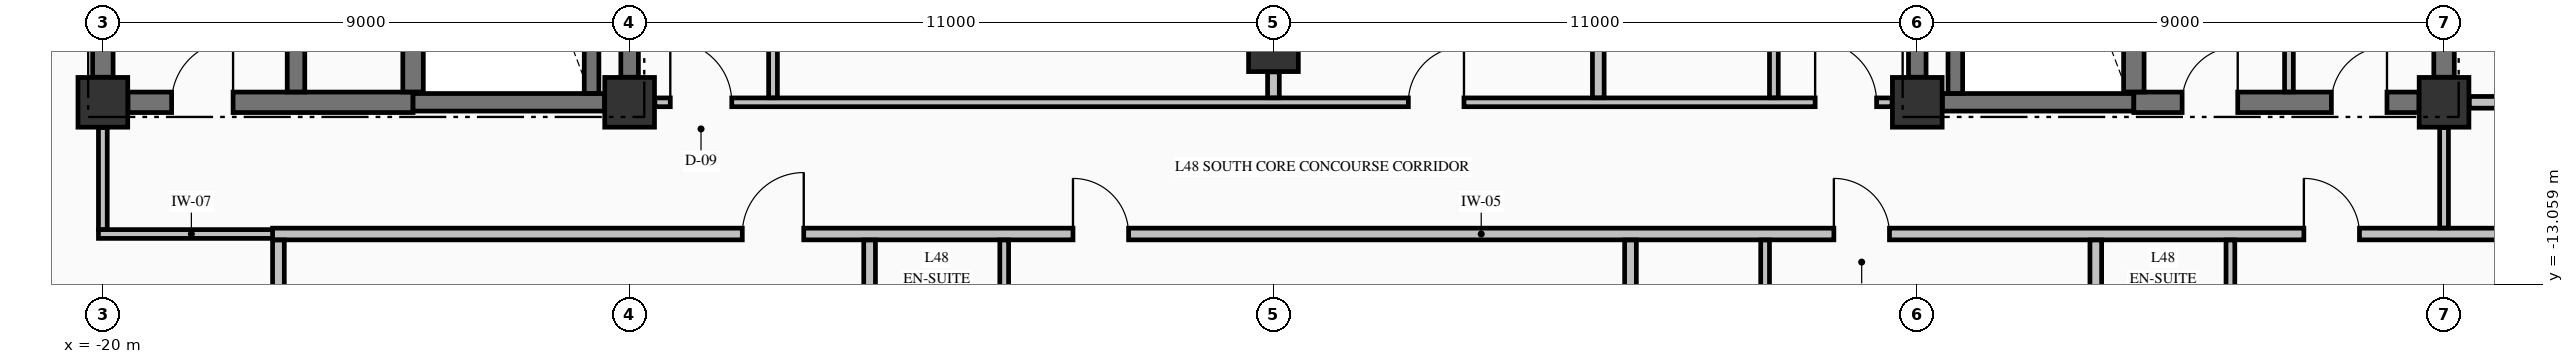
"""IFC4 building model, lengths in metres.
Left out: names, types, materials, properties, quantities, classifications, styles, units other than length and angle.
Written with IfcOpenShell. Run it as: python <this file> out.ifc"""

import sys

from ifc_helpers import new_model, si_unit, direction, frame, frame_2d, origin, origin_2d, place, context, subcontext, project, spatial, rectangle, extrude, element, fill, save


model = new_model("IFC4")
c1 = context("Model", 3, precision=1e-05, world=origin(), true_north=direction((0.0, 1.0)))
c2 = subcontext(c1, "Body", "Model", "MODEL_VIEW")
j1 = project(units=[si_unit("LENGTHUNIT", "METRE"), si_unit("PLANEANGLEUNIT", "RADIAN")], contexts=[c1])
p1 = place(None, origin())
s1 = spatial("IfcSite", under=j1, at=p1, CompositionType="ELEMENT")
p2 = place(p1, origin())
s2 = spatial("IfcBuilding", under=s1, at=p2, CompositionType="ELEMENT")
p3 = place(p2, frame((0.0, 0.0, 186.46)))
s3 = spatial("IfcBuildingStorey", under=s2, at=p3, CompositionType="ELEMENT", Elevation=186.46)
for number, where, z_axis, x_axis in (
    (1, (-20.0, -9.95, -0.425), (0.0, 0.0, 1.0), (1.0, 0.0, 0.0)),
    (2, (-11.0, -9.95, -0.425), (0.0, 0.0, 1.0), (1.0, 0.0, 0.0)),
    (3, (11.0, -9.95, -0.425), (0.0, 0.0, 1.0), (1.0, 0.0, 0.0)),
    (4, (20.0, -9.95, -0.425), (0.0, 0.0, 1.0), (1.0, 0.0, 0.0)),
    (5, (0.0, -9.0, -0.425), (0.0, 0.0, 1.0), (1.0, 0.0, 0.0)),
):
    element("IfcColumn", number, at=place(p3, frame(where, z_axis=z_axis, x_axis=x_axis)), inside=s3, PredefinedType="COLUMN", context=c2, shape_type="SweptSolid", body=[
        extrude(rectangle(XDim=0.85, YDim=0.85, at=origin_2d()), origin(), (0.0, 0.0, 1.0), 5.0),
    ])
p4 = place(p3, frame((-19.571, -9.95, 0.0), z_axis=(0.0, 0.0, 1.0), x_axis=(1.0, 0.0, 0.0)))
e6 = element("IfcWall", 6, at=p4, inside=s3, PredefinedType="SHEAR", context=c2, shape_type="SweptSolid", body=[
    extrude(rectangle(XDim=4.871, YDim=0.35, at=frame_2d((2.436, 0.0))), origin(), (0.0, 0.0, 1.0), 4.575),
])
p5 = place(p4, frame((0.746, 0.0, 0.0)))
e7 = element("IfcOpeningElement", 7, at=p5, cuts=e6, PredefinedType="OPENING", context=c2, shape_type="SweptSolid", body=[
    extrude(rectangle(XDim=1.05, YDim=2.15, at=frame_2d((0.525, 1.075))), frame((0.0, 0.185, 0.0), z_axis=(0.0, -1.0, 0.0), x_axis=(1.0, 0.0, 0.0)), (0.0, 0.0, 1.0), 0.37),
])
for number, where, z_axis, x_axis in (
    (8, (-14.7, -9.95, 0.0), (0.0, 0.0, 1.0), (1.0, 0.0, 0.0)),
    (9, (11.429, -9.95, 0.0), (0.0, 0.0, 1.0), (1.0, 0.0, 0.0)),
):
    element("IfcWall", number, at=place(p3, frame(where, z_axis=z_axis, x_axis=x_axis)), inside=s3, PredefinedType="SHEAR", context=c2, shape_type="SweptSolid", body=[
        extrude(rectangle(XDim=3.271, YDim=0.3, at=frame_2d((1.635, 0.0))), origin(), (0.0, 0.0, 1.0), 4.575),
    ])
p6 = place(p3, frame((14.7, -9.95, 0.0), z_axis=(0.0, 0.0, 1.0), x_axis=(1.0, 0.0, 0.0)))
e10 = element("IfcWall", 10, at=p6, inside=s3, PredefinedType="SHEAR", context=c2, shape_type="SweptSolid", body=[
    extrude(rectangle(XDim=4.871, YDim=0.35, at=frame_2d((2.436, 0.0))), origin(), (0.0, 0.0, 1.0), 4.575),
])
p7 = place(p6, frame((0.825, 0.0, 0.0)))
e11 = element("IfcOpeningElement", 11, at=p7, cuts=e10, PredefinedType="OPENING", context=c2, shape_type="SweptSolid", body=[
    extrude(rectangle(XDim=0.95, YDim=2.15, at=frame_2d((0.475, 1.075))), frame((0.0, 0.185, 0.0), z_axis=(0.0, -1.0, 0.0), x_axis=(1.0, 0.0, 0.0)), (0.0, 0.0, 1.0), 0.37),
])
p8 = place(p6, frame((3.375, 0.0, 0.0)))
e12 = element("IfcOpeningElement", 12, at=p8, cuts=e10, PredefinedType="OPENING", context=c2, shape_type="SweptSolid", body=[
    extrude(rectangle(XDim=0.95, YDim=2.15, at=frame_2d((0.475, 1.075))), frame((0.0, 0.185, 0.0), z_axis=(0.0, -1.0, 0.0), x_axis=(1.0, 0.0, 0.0)), (0.0, 0.0, 1.0), 0.37),
])
p9 = place(p3, frame((-20.075, -12.2, 0.0), z_axis=(0.0, 0.0, 1.0), x_axis=(1.0, 0.0, 0.0)))
e13 = element("IfcWall", 13, at=p9, inside=s3, PredefinedType="PARTITIONING", context=c2, shape_type="SweptSolid", body=[
    extrude(rectangle(XDim=3.175, YDim=0.15, at=frame_2d((1.587, 0.0))), origin(), (0.0, 0.0, 1.0), 4.575),
])
p10 = place(p3, frame((-17.1, -12.2, 0.0), z_axis=(0.0, 0.0, 1.0), x_axis=(1.0, 0.0, 0.0)))
e14 = element("IfcWall", 14, at=p10, inside=s3, PredefinedType="PARTITIONING", context=c2, shape_type="SweptSolid", body=[
    extrude(rectangle(XDim=39.2, YDim=0.2, at=frame_2d((19.6, 0.0))), origin(), (0.0, 0.0, 1.0), 4.575),
])
p11 = place(p10, frame((8.025, 0.0, 0.0)))
e15 = element("IfcOpeningElement", 15, at=p11, cuts=e14, PredefinedType="OPENING", context=c2, shape_type="SweptSolid", body=[
    extrude(rectangle(XDim=1.05, YDim=2.15, at=frame_2d((0.525, 1.075))), frame((0.0, 0.11, 0.0), z_axis=(0.0, -1.0, 0.0), x_axis=(1.0, 0.0, 0.0)), (0.0, 0.0, 1.0), 0.22),
])
p12 = place(p10, frame((13.675, 0.0, 0.0)))
e16 = element("IfcOpeningElement", 16, at=p12, cuts=e14, PredefinedType="OPENING", context=c2, shape_type="SweptSolid", body=[
    extrude(rectangle(XDim=0.95, YDim=2.15, at=frame_2d((0.475, 1.075))), frame((0.0, 0.11, 0.0), z_axis=(0.0, -1.0, 0.0), x_axis=(1.0, 0.0, 0.0)), (0.0, 0.0, 1.0), 0.22),
])
p13 = place(p10, frame((26.675, 0.0, 0.0)))
e17 = element("IfcOpeningElement", 17, at=p13, cuts=e14, PredefinedType="OPENING", context=c2, shape_type="SweptSolid", body=[
    extrude(rectangle(XDim=0.95, YDim=2.02, at=frame_2d((0.475, 1.01))), frame((0.0, 0.11, 0.0), z_axis=(0.0, -1.0, 0.0), x_axis=(1.0, 0.0, 0.0)), (0.0, 0.0, 1.0), 0.22),
])
p14 = place(p10, frame((34.705, 0.0, 0.0)))
e18 = element("IfcOpeningElement", 18, at=p14, cuts=e14, PredefinedType="OPENING", context=c2, shape_type="SweptSolid", body=[
    extrude(rectangle(XDim=0.95, YDim=2.15, at=frame_2d((0.475, 1.075))), frame((0.0, 0.11, 0.0), z_axis=(0.0, -1.0, 0.0), x_axis=(1.0, 0.0, 0.0)), (0.0, 0.0, 1.0), 0.22),
])
p15 = place(p3, frame((-10.569, -9.95, 0.0), z_axis=(0.0, 0.0, 1.0), x_axis=(1.0, 0.0, 0.0)))
e19 = element("IfcWall", 19, at=p15, inside=s3, PredefinedType="PARTITIONING", context=c2, shape_type="SweptSolid", body=[
    extrude(rectangle(XDim=21.138, YDim=0.15, at=frame_2d((10.569, 0.0))), origin(), (0.0, 0.0, 1.0), 4.575),
])
p16 = place(p15, frame((0.264, 0.0, 0.0)))
e20 = element("IfcOpeningElement", 20, at=p16, cuts=e19, PredefinedType="OPENING", context=c2, shape_type="SweptSolid", body=[
    extrude(rectangle(XDim=1.05, YDim=2.15, at=frame_2d((0.525, 1.075))), frame((0.0, 0.085, 0.0), z_axis=(0.0, -1.0, 0.0), x_axis=(1.0, 0.0, 0.0)), (0.0, 0.0, 1.0), 0.17),
])
p17 = place(p15, frame((19.824, 0.0, 0.0)))
e21 = element("IfcOpeningElement", 21, at=p17, cuts=e19, PredefinedType="OPENING", context=c2, shape_type="SweptSolid", body=[
    extrude(rectangle(XDim=1.05, YDim=2.15, at=frame_2d((0.525, 1.075))), frame((0.0, 0.085, 0.0), z_axis=(0.0, -1.0, 0.0), x_axis=(1.0, 0.0, 0.0)), (0.0, 0.0, 1.0), 0.17),
])
p18 = place(p15, frame((12.874, 0.0, 0.0)))
e22 = element("IfcOpeningElement", 22, at=p18, cuts=e19, PredefinedType="OPENING", context=c2, shape_type="SweptSolid", body=[
    extrude(rectangle(XDim=0.95, YDim=2.15, at=frame_2d((0.475, 1.075))), frame((0.0, 0.085, 0.0), z_axis=(0.0, -1.0, 0.0), x_axis=(1.0, 0.0, 0.0)), (0.0, 0.0, 1.0), 0.17),
])
p19 = place(p3, frame((20.431, -9.95, 0.0), z_axis=(0.0, 0.0, 1.0), x_axis=(1.0, 0.0, 0.0)))
e23 = element("IfcWall", 23, at=p19, inside=s3, PredefinedType="PARTITIONING", context=c2, shape_type="SweptSolid", body=[
    extrude(rectangle(XDim=6.404, YDim=0.2, at=frame_2d((3.202, 0.0))), origin(), (0.0, 0.0, 1.0), 4.575),
])
p20 = place(p3, frame((-20.0, -9.521, 0.0), z_axis=(0.0, 0.0, 1.0), x_axis=(0.0, 1.0, 0.0)))
e24 = element("IfcWall", 24, at=p20, inside=s3, PredefinedType="SHEAR", context=c2, shape_type="SweptSolid", body=[
    extrude(rectangle(XDim=9.092, YDim=0.35, at=frame_2d((4.546, 0.0))), origin(), (0.0, 0.0, 1.0), 4.575),
])
p21 = place(p3, frame((-16.7, -9.773, 0.0), z_axis=(0.0, 0.0, 1.0), x_axis=(0.0, 1.0, 0.0)))
e25 = element("IfcWall", 25, at=p21, inside=s3, PredefinedType="SHEAR", context=c2, shape_type="SweptSolid", body=[
    extrude(rectangle(XDim=9.371, YDim=0.3, at=frame_2d((4.686, 0.0))), origin(), (0.0, 0.0, 1.0), 4.575),
])
p22 = place(p3, frame((-14.7, -9.773, 0.0), z_axis=(0.0, 0.0, 1.0), x_axis=(0.0, 1.0, 0.0)))
e26 = element("IfcWall", 26, at=p22, inside=s3, PredefinedType="SHEAR", context=c2, shape_type="SweptSolid", body=[
    extrude(rectangle(XDim=9.371, YDim=0.35, at=frame_2d((4.686, 0.0))), origin(), (0.0, 0.0, 1.0), 4.575),
])
p23 = place(p3, frame((-11.65, -9.798, 0.0), z_axis=(0.0, 0.0, 1.0), x_axis=(0.0, 1.0, 0.0)))
e27 = element("IfcWall", 27, at=p23, inside=s3, PredefinedType="SOLIDWALL", context=c2, shape_type="SweptSolid", body=[
    extrude(rectangle(XDim=9.396, YDim=0.25, at=frame_2d((4.698, 0.0))), origin(), (0.0, 0.0, 1.0), 4.575),
])
for number, where, z_axis, x_axis in (
    (28, (-11.0, -9.521, 0.0), (0.0, 0.0, 1.0), (0.0, 1.0, 0.0)),
    (29, (11.0, -9.521, 0.0), (0.0, 0.0, 1.0), (0.0, 1.0, 0.0)),
):
    element("IfcWall", number, at=place(p3, frame(where, z_axis=z_axis, x_axis=x_axis)), inside=s3, PredefinedType="SHEAR", context=c2, shape_type="SweptSolid", body=[
        extrude(rectangle(XDim=9.092, YDim=0.3, at=frame_2d((4.546, 0.0))), origin(), (0.0, 0.0, 1.0), 4.575),
    ])
p24 = place(p3, frame((11.65, -9.798, 0.0), z_axis=(0.0, 0.0, 1.0), x_axis=(0.0, 1.0, 0.0)))
e30 = element("IfcWall", 30, at=p24, inside=s3, PredefinedType="SOLIDWALL", context=c2, shape_type="SweptSolid", body=[
    extrude(rectangle(XDim=9.396, YDim=0.25, at=frame_2d((4.698, 0.0))), origin(), (0.0, 0.0, 1.0), 4.575),
])
p25 = place(p3, frame((14.7, -9.773, 0.0), z_axis=(0.0, 0.0, 1.0), x_axis=(0.0, 1.0, 0.0)))
e31 = element("IfcWall", 31, at=p25, inside=s3, PredefinedType="SHEAR", context=c2, shape_type="SweptSolid", body=[
    extrude(rectangle(XDim=9.371, YDim=0.35, at=frame_2d((4.686, 0.0))), origin(), (0.0, 0.0, 1.0), 4.575),
])
p26 = place(p3, frame((20.0, -9.521, 0.0), z_axis=(0.0, 0.0, 1.0), x_axis=(0.0, 1.0, 0.0)))
e32 = element("IfcWall", 32, at=p26, inside=s3, PredefinedType="SHEAR", context=c2, shape_type="SweptSolid", body=[
    extrude(rectangle(XDim=9.092, YDim=0.35, at=frame_2d((4.546, 0.0))), origin(), (0.0, 0.0, 1.0), 4.575),
])
p27 = place(p3, frame((-20.0, -12.122, 0.0), z_axis=(0.0, 0.0, 1.0), x_axis=(0.0, 1.0, 0.0)))
e33 = element("IfcWall", 33, at=p27, inside=s3, PredefinedType="PARTITIONING", context=c2, shape_type="SweptSolid", body=[
    extrude(rectangle(XDim=1.741, YDim=0.15, at=frame_2d((0.871, 0.0))), origin(), (0.0, 0.0, 1.0), 3.767),
])
p28 = place(p3, frame((-17.0, -18.994, 0.0), z_axis=(0.0, 0.0, 1.0), x_axis=(0.0, 1.0, 0.0)))
e34 = element("IfcWall", 34, at=p28, inside=s3, PredefinedType="PARTITIONING", context=c2, shape_type="SweptSolid", body=[
    extrude(rectangle(XDim=6.691, YDim=0.2, at=frame_2d((3.345, 0.0))), origin(), (0.0, 0.0, 1.0), 4.575),
])
p29 = place(p3, frame((-8.55, -9.872, 0.0), z_axis=(0.0, 0.0, 1.0), x_axis=(0.0, 1.0, 0.0)))
e35 = element("IfcWall", 35, at=p29, inside=s3, PredefinedType="PARTITIONING", context=c2, shape_type="SweptSolid", body=[
    extrude(rectangle(XDim=8.569, YDim=0.15, at=frame_2d((4.285, 0.0))), origin(), (0.0, 0.0, 1.0), 4.575),
])
p30 = place(p29, frame((3.802, 0.0, 0.0)))
e36 = element("IfcOpeningElement", 36, at=p30, cuts=e35, PredefinedType="OPENING", context=c2, shape_type="SweptSolid", body=[
    extrude(rectangle(XDim=1.0, YDim=2.15, at=frame_2d((0.5, 1.075))), frame((0.0, 0.085, 0.0), z_axis=(0.0, -1.0, 0.0), x_axis=(1.0, 0.0, 0.0)), (0.0, 0.0, 1.0), 0.17),
])
p31 = place(p3, frame((-6.9, -15.072, 0.0), z_axis=(0.0, 0.0, 1.0), x_axis=(0.0, 1.0, 0.0)))
e37 = element("IfcWall", 37, at=p31, inside=s3, PredefinedType="PARTITIONING", context=c2, shape_type="SweptSolid", body=[
    extrude(rectangle(XDim=2.769, YDim=0.2, at=frame_2d((1.385, 0.0))), origin(), (0.0, 0.0, 1.0), 4.575),
])
p32 = place(p3, frame((-4.6, -15.072, 0.0), z_axis=(0.0, 0.0, 1.0), x_axis=(0.0, 1.0, 0.0)))
e38 = element("IfcWall", 38, at=p32, inside=s3, PredefinedType="PARTITIONING", context=c2, shape_type="SweptSolid", body=[
    extrude(rectangle(XDim=2.769, YDim=0.15, at=frame_2d((1.385, 0.0))), origin(), (0.0, 0.0, 1.0), 4.575),
])
p33 = place(p3, frame((0.0, -9.872, 0.0), z_axis=(0.0, 0.0, 1.0), x_axis=(0.0, 1.0, 0.0)))
e39 = element("IfcWall", 39, at=p33, inside=s3, PredefinedType="PARTITIONING", context=c2, shape_type="SweptSolid", body=[
    extrude(rectangle(XDim=0.441, YDim=0.2, at=frame_2d((0.221, 0.0))), origin(), (0.0, 0.0, 1.0), 2.167),
])
p34 = place(p3, frame((5.55, -9.872, 0.0), z_axis=(0.0, 0.0, 1.0), x_axis=(0.0, 1.0, 0.0)))
e40 = element("IfcWall", 40, at=p34, inside=s3, PredefinedType="PARTITIONING", context=c2, shape_type="SweptSolid", body=[
    extrude(rectangle(XDim=4.569, YDim=0.2, at=frame_2d((2.285, 0.0))), origin(), (0.0, 0.0, 1.0), 4.575),
])
p35 = place(p3, frame((6.1, -14.372, 0.0), z_axis=(0.0, 0.0, 1.0), x_axis=(0.0, 1.0, 0.0)))
e41 = element("IfcWall", 41, at=p35, inside=s3, PredefinedType="PARTITIONING", context=c2, shape_type="SweptSolid", body=[
    extrude(rectangle(XDim=2.069, YDim=0.2, at=frame_2d((1.035, 0.0))), origin(), (0.0, 0.0, 1.0), 4.575),
])
p36 = place(p3, frame((8.4, -14.372, 0.0), z_axis=(0.0, 0.0, 1.0), x_axis=(0.0, 1.0, 0.0)))
e42 = element("IfcWall", 42, at=p36, inside=s3, PredefinedType="PARTITIONING", context=c2, shape_type="SweptSolid", body=[
    extrude(rectangle(XDim=2.069, YDim=0.15, at=frame_2d((1.035, 0.0))), origin(), (0.0, 0.0, 1.0), 4.575),
])
p37 = place(p3, frame((8.55, -9.872, 0.0), z_axis=(0.0, 0.0, 1.0), x_axis=(0.0, 1.0, 0.0)))
e43 = element("IfcWall", 43, at=p37, inside=s3, PredefinedType="PARTITIONING", context=c2, shape_type="SweptSolid", body=[
    extrude(rectangle(XDim=4.569, YDim=0.15, at=frame_2d((2.285, 0.0))), origin(), (0.0, 0.0, 1.0), 4.575),
])
p38 = place(p37, frame((1.847, 0.0, 0.0)))
e44 = element("IfcOpeningElement", 44, at=p38, cuts=e43, PredefinedType="OPENING", context=c2, shape_type="SweptSolid", body=[
    extrude(rectangle(XDim=0.95, YDim=2.15, at=frame_2d((0.475, 1.075))), frame((0.0, 0.085, 0.0), z_axis=(0.0, -1.0, 0.0), x_axis=(1.0, 0.0, 0.0)), (0.0, 0.0, 1.0), 0.17),
])
p39 = place(p3, frame((14.05, -15.072, 0.0), z_axis=(0.0, 0.0, 1.0), x_axis=(0.0, 1.0, 0.0)))
e45 = element("IfcWall", 45, at=p39, inside=s3, PredefinedType="PARTITIONING", context=c2, shape_type="SweptSolid", body=[
    extrude(rectangle(XDim=2.769, YDim=0.2, at=frame_2d((1.385, 0.0))), origin(), (0.0, 0.0, 1.0), 4.575),
])
p40 = place(p3, frame((16.35, -15.072, 0.0), z_axis=(0.0, 0.0, 1.0), x_axis=(0.0, 1.0, 0.0)))
e46 = element("IfcWall", 46, at=p40, inside=s3, PredefinedType="PARTITIONING", context=c2, shape_type="SweptSolid", body=[
    extrude(rectangle(XDim=2.769, YDim=0.15, at=frame_2d((1.385, 0.0))), origin(), (0.0, 0.0, 1.0), 4.575),
])
p41 = place(p3, frame((17.35, -9.772, 0.0), z_axis=(0.0, 0.0, 1.0), x_axis=(0.0, 1.0, 0.0)))
e47 = element("IfcWall", 47, at=p41, inside=s3, PredefinedType="PARTITIONING", context=c2, shape_type="SweptSolid", body=[
    extrude(rectangle(XDim=7.194, YDim=0.15, at=frame_2d((3.597, 0.0))), origin(), (0.0, 0.0, 1.0), 4.575),
])
p42 = place(p3, frame((20.0, -12.097, 0.0), z_axis=(0.0, 0.0, 1.0), x_axis=(0.0, 1.0, 0.0)))
e48 = element("IfcWall", 48, at=p42, inside=s3, PredefinedType="PARTITIONING", context=c2, shape_type="SweptSolid", body=[
    extrude(rectangle(XDim=1.716, YDim=0.15, at=frame_2d((0.858, 0.0))), origin(), (0.0, 0.0, 1.0), 3.767),
])
p43 = place(p5, origin())
e49 = element("IfcDoor", 49, at=p43, inside=s3, OperationType="SINGLE_SWING_RIGHT", PredefinedType="DOOR", context=c2, shape_type="SweptSolid", body=[
    extrude(rectangle(XDim=1.05, YDim=2.15, at=frame_2d((0.525, 1.075))), frame((0.0, 0.025, 0.0), z_axis=(0.0, -1.0, 0.0), x_axis=(1.0, 0.0, 0.0)), (0.0, 0.0, 1.0), 0.05),
])
fill(e7, e49)
p44 = place(p7, origin())
e50 = element("IfcDoor", 50, at=p44, inside=s3, OperationType="SINGLE_SWING_RIGHT", PredefinedType="DOOR", context=c2, shape_type="SweptSolid", body=[
    extrude(rectangle(XDim=0.95, YDim=2.15, at=frame_2d((0.475, 1.075))), frame((0.0, 0.025, 0.0), z_axis=(0.0, -1.0, 0.0), x_axis=(1.0, 0.0, 0.0)), (0.0, 0.0, 1.0), 0.05),
])
fill(e11, e50)
p45 = place(p8, origin())
e51 = element("IfcDoor", 51, at=p45, inside=s3, OperationType="SINGLE_SWING_RIGHT", PredefinedType="DOOR", context=c2, shape_type="SweptSolid", body=[
    extrude(rectangle(XDim=0.95, YDim=2.15, at=frame_2d((0.475, 1.075))), frame((0.0, 0.025, 0.0), z_axis=(0.0, -1.0, 0.0), x_axis=(1.0, 0.0, 0.0)), (0.0, 0.0, 1.0), 0.05),
])
fill(e12, e51)
p46 = place(p16, origin())
e52 = element("IfcDoor", 52, at=p46, inside=s3, OperationType="SINGLE_SWING_LEFT", PredefinedType="DOOR", context=c2, shape_type="SweptSolid", body=[
    extrude(rectangle(XDim=1.05, YDim=2.15, at=frame_2d((0.525, 1.075))), frame((0.0, 0.025, 0.0), z_axis=(0.0, -1.0, 0.0), x_axis=(1.0, 0.0, 0.0)), (0.0, 0.0, 1.0), 0.05),
])
fill(e20, e52)
p47 = place(p17, origin())
e53 = element("IfcDoor", 53, at=p47, inside=s3, OperationType="SINGLE_SWING_LEFT", PredefinedType="DOOR", context=c2, shape_type="SweptSolid", body=[
    extrude(rectangle(XDim=1.05, YDim=2.15, at=frame_2d((0.525, 1.075))), frame((0.0, 0.025, 0.0), z_axis=(0.0, -1.0, 0.0), x_axis=(1.0, 0.0, 0.0)), (0.0, 0.0, 1.0), 0.05),
])
fill(e21, e53)
p48 = place(p11, origin())
e54 = element("IfcDoor", 54, at=p48, inside=s3, OperationType="SINGLE_SWING_RIGHT", PredefinedType="DOOR", context=c2, shape_type="SweptSolid", body=[
    extrude(rectangle(XDim=1.05, YDim=2.15, at=frame_2d((0.525, 1.075))), frame((0.0, 0.025, 0.0), z_axis=(0.0, -1.0, 0.0), x_axis=(1.0, 0.0, 0.0)), (0.0, 0.0, 1.0), 0.05),
])
fill(e15, e54)
p49 = place(p12, origin())
e55 = element("IfcDoor", 55, at=p49, inside=s3, OperationType="SINGLE_SWING_LEFT", PredefinedType="DOOR", context=c2, shape_type="SweptSolid", body=[
    extrude(rectangle(XDim=0.95, YDim=2.15, at=frame_2d((0.475, 1.075))), frame((0.0, 0.025, 0.0), z_axis=(0.0, -1.0, 0.0), x_axis=(1.0, 0.0, 0.0)), (0.0, 0.0, 1.0), 0.05),
])
fill(e16, e55)
p50 = place(p13, origin())
e56 = element("IfcDoor", 56, at=p50, inside=s3, OperationType="SINGLE_SWING_LEFT", PredefinedType="DOOR", context=c2, shape_type="SweptSolid", body=[
    extrude(rectangle(XDim=0.95, YDim=2.02, at=frame_2d((0.475, 1.01))), frame((0.0, 0.025, 0.0), z_axis=(0.0, -1.0, 0.0), x_axis=(1.0, 0.0, 0.0)), (0.0, 0.0, 1.0), 0.05),
])
fill(e17, e56)
p51 = place(p14, origin())
e57 = element("IfcDoor", 57, at=p51, inside=s3, OperationType="SINGLE_SWING_LEFT", PredefinedType="DOOR", context=c2, shape_type="SweptSolid", body=[
    extrude(rectangle(XDim=0.95, YDim=2.15, at=frame_2d((0.475, 1.075))), frame((0.0, 0.025, 0.0), z_axis=(0.0, -1.0, 0.0), x_axis=(1.0, 0.0, 0.0)), (0.0, 0.0, 1.0), 0.05),
])
fill(e18, e57)
p52 = place(p18, origin())
e58 = element("IfcDoor", 58, at=p52, inside=s3, OperationType="SINGLE_SWING_RIGHT", PredefinedType="DOOR", context=c2, shape_type="SweptSolid", body=[
    extrude(rectangle(XDim=0.95, YDim=2.15, at=frame_2d((0.475, 1.075))), frame((0.0, 0.025, 0.0), z_axis=(0.0, -1.0, 0.0), x_axis=(1.0, 0.0, 0.0)), (0.0, 0.0, 1.0), 0.05),
])
fill(e22, e58)
save(model, sys.argv[1])
